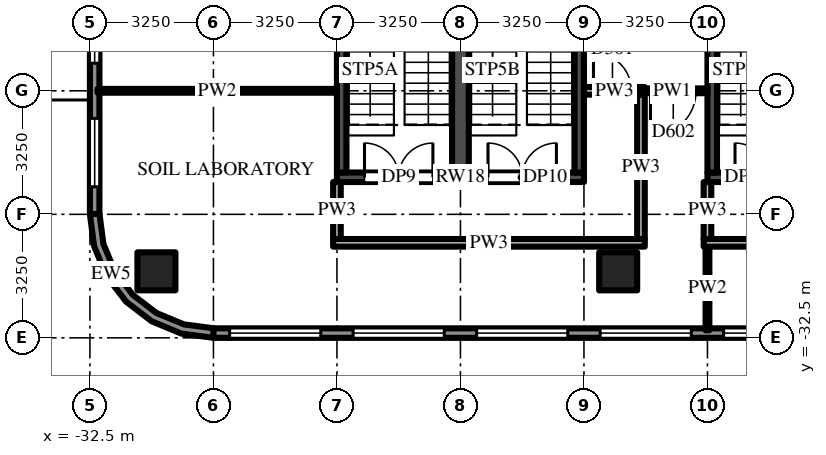
"""IFC4 building model, lengths in metres.
Left out: names, types, materials, properties, quantities, classifications, styles, units other than length and angle.
Written with IfcOpenShell. Run it as: python <this file> out.ifc"""

import sys

from ifc_helpers import new_model, si_unit, direction, frame, frame_2d, origin, origin_2d, place, context, subcontext, project, spatial, polyline, rectangle, outline, extrude, source, transform, mapped, element, fill, save


model = new_model("IFC4")
c1 = context("Model", 3, precision=1e-05, world=origin(), true_north=direction((0.0, 1.0)))
c2 = subcontext(c1, "Body", "Model", "MODEL_VIEW")
j1 = project(units=[si_unit("LENGTHUNIT", "METRE"), si_unit("PLANEANGLEUNIT", "RADIAN")], contexts=[c1])
p1 = place(None, origin())
s1 = spatial("IfcSite", under=j1, at=p1, CompositionType="ELEMENT")
p2 = place(p1, origin())
s2 = spatial("IfcBuilding", under=s1, at=p2, CompositionType="ELEMENT")
p3 = place(p2, frame((0.0, 0.0, 24.0)))
s3 = spatial("IfcBuildingStorey", under=s2, at=p3, CompositionType="ELEMENT", Elevation=24.0)
m1 = source(origin(), c2, "Body", "SweptSolid", [
    extrude(rectangle(XDim=1.0, YDim=1.0, at=origin_2d()), origin(), (0.0, 0.0, 1.0), 5.0),
])
for number, where, z_axis, x_axis in (
    (1, (-18.6, -30.75, 0.0), (0.0, 0.0, 1.0), (1.0, 0.0, 0.0)),
    (2, (-30.75, -30.75, 0.0), (0.0, 0.0, 1.0), (1.0, 0.0, 0.0)),
):
    element("IfcColumn", number, at=place(p3, frame(where, z_axis=z_axis, x_axis=x_axis)), inside=s3, PredefinedType="COLUMN", context=c2, shape_type="MappedRepresentation", body=[
        mapped(m1, transform((0.0, 0.0, 0.0))),
    ])
m2 = source(origin(), c2, "Body", "SweptSolid", [
    extrude(rectangle(XDim=6.5, YDim=0.25, at=frame_2d((3.25, 0.0))), origin(), (0.0, 0.0, 1.0), 4.7),
])
p4 = place(p3, frame((-26.0, -28.275, 0.0), z_axis=(0.0, 0.0, 1.0), x_axis=(1.0, 0.0, 0.0)))
e3 = element("IfcWall", 3, at=p4, inside=s3, PredefinedType="SHEAR", context=c2, shape_type="MappedRepresentation", body=[
    mapped(m2, transform((0.0, 0.0, 0.0))),
])
m3 = source(origin(), c2, "Body", "SweptSolid", [
    extrude(rectangle(XDim=1.8, YDim=2.1, at=frame_2d((0.9, 1.05))), frame((0.0, 0.135, 0.0), z_axis=(0.0, -1.0, 0.0), x_axis=(1.0, 0.0, 0.0)), (0.0, 0.0, 1.0), 0.27),
])
p5 = place(p4, frame((0.725, 0.0, 0.0)))
e4 = element("IfcOpeningElement", 4, at=p5, cuts=e3, PredefinedType="OPENING", context=c2, shape_type="MappedRepresentation", body=[
    mapped(m3, transform((0.0, 0.0, 0.0))),
])
p6 = place(p4, frame((3.975, 0.0, 0.0)))
e5 = element("IfcOpeningElement", 5, at=p6, cuts=e3, PredefinedType="OPENING", context=c2, shape_type="MappedRepresentation", body=[
    mapped(m3, transform((0.0, 0.0, 0.0))),
])
m4 = source(origin(), c2, "Body", "SweptSolid", [
    extrude(rectangle(XDim=8.3, YDim=0.25, at=frame_2d((4.15, 0.0))), origin(), (0.0, 0.0, 1.0), 4.7),
])
for number, where, z_axis, x_axis in (
    (6, (-25.875, -28.15, 0.0), (0.0, 0.0, 1.0), (0.0, 1.0, 0.0)),
    (7, (-19.625, -28.15, 0.0), (0.0, 0.0, 1.0), (0.0, 1.0, 0.0)),
):
    element("IfcWall", number, at=place(p3, frame(where, z_axis=z_axis, x_axis=x_axis)), inside=s3, PredefinedType="SHEAR", context=c2, shape_type="MappedRepresentation", body=[
        mapped(m4, transform((0.0, 0.0, 0.0))),
    ])
m5 = source(origin(), c2, "Body", "SweptSolid", [
    extrude(rectangle(XDim=8.3, YDim=0.44, at=frame_2d((4.15, 0.0))), origin(), (0.0, 0.0, 1.0), 4.7),
])
p7 = place(p3, frame((-22.75, -28.15, 0.0), z_axis=(0.0, 0.0, 1.0), x_axis=(0.0, 1.0, 0.0)))
e8 = element("IfcWall", 8, at=p7, inside=s3, PredefinedType="SHEAR", context=c2, shape_type="MappedRepresentation", body=[
    mapped(m5, transform((0.0, 0.0, 0.0))),
])
p8 = place(p3, frame((-16.25, -28.275, 0.0), z_axis=(0.0, 0.0, 1.0), x_axis=(1.0, 0.0, 0.0)))
e9 = element("IfcWall", 9, at=p8, inside=s3, PredefinedType="SHEAR", context=c2, shape_type="MappedRepresentation", body=[
    mapped(m2, transform((0.0, 0.0, 0.0))),
])
p9 = place(p8, frame((0.725, 0.0, 0.0)))
e10 = element("IfcOpeningElement", 10, at=p9, cuts=e9, PredefinedType="OPENING", context=c2, shape_type="MappedRepresentation", body=[
    mapped(m3, transform((0.0, 0.0, 0.0))),
])
p10 = place(p8, frame((3.975, 0.0, 0.0)))
e11 = element("IfcOpeningElement", 11, at=p10, cuts=e9, PredefinedType="OPENING", context=c2, shape_type="MappedRepresentation", body=[
    mapped(m3, transform((0.0, 0.0, 0.0))),
])
p11 = place(p3, frame((-16.125, -28.15, 0.0), z_axis=(0.0, 0.0, 1.0), x_axis=(0.0, 1.0, 0.0)))
e12 = element("IfcWall", 12, at=p11, inside=s3, PredefinedType="SHEAR", context=c2, shape_type="MappedRepresentation", body=[
    mapped(m4, transform((0.0, 0.0, 0.0))),
])
m6 = source(origin(), c2, "Body", "SweptSolid", [
    extrude(rectangle(XDim=58.5, YDim=0.25, at=frame_2d((29.25, 0.0))), origin(), (0.0, 0.0, 1.0), 4.7),
])
p12 = place(p3, frame((-32.375, 29.25, 0.0), z_axis=(0.0, 0.0, 1.0), x_axis=(0.0, -1.0, 0.0)))
e13 = element("IfcWall", 13, at=p12, inside=s3, PredefinedType="SOLIDWALL", context=c2, shape_type="MappedRepresentation", body=[
    mapped(m6, transform((0.0, 0.0, 0.0))),
])
m7 = source(origin(), c2, "Body", "SweptSolid", [
    extrude(rectangle(XDim=1.8, YDim=3.3, at=frame_2d((0.9, 1.65))), frame((0.0, 0.135, 0.0), z_axis=(0.0, -1.0, 0.0), x_axis=(1.0, 0.0, 0.0)), (0.0, 0.0, 1.0), 0.27),
])
p13 = place(p12, frame((0.725, 0.0, 0.6)))
e14 = element("IfcOpeningElement", 14, at=p13, cuts=e13, PredefinedType="OPENING", context=c2, shape_type="MappedRepresentation", body=[
    mapped(m7, transform((0.0, 0.0, 0.0))),
])
p14 = place(p12, frame((3.975, 0.0, 0.6)))
e15 = element("IfcOpeningElement", 15, at=p14, cuts=e13, PredefinedType="OPENING", context=c2, shape_type="MappedRepresentation", body=[
    mapped(m7, transform((0.0, 0.0, 0.0))),
])
p15 = place(p12, frame((7.225, 0.0, 0.6)))
e16 = element("IfcOpeningElement", 16, at=p15, cuts=e13, PredefinedType="OPENING", context=c2, shape_type="MappedRepresentation", body=[
    mapped(m7, transform((0.0, 0.0, 0.0))),
])
p16 = place(p12, frame((10.475, 0.0, 0.6)))
e17 = element("IfcOpeningElement", 17, at=p16, cuts=e13, PredefinedType="OPENING", context=c2, shape_type="MappedRepresentation", body=[
    mapped(m7, transform((0.0, 0.0, 0.0))),
])
p17 = place(p12, frame((13.725, 0.0, 0.6)))
e18 = element("IfcOpeningElement", 18, at=p17, cuts=e13, PredefinedType="OPENING", context=c2, shape_type="MappedRepresentation", body=[
    mapped(m7, transform((0.0, 0.0, 0.0))),
])
p18 = place(p12, frame((16.975, 0.0, 0.6)))
e19 = element("IfcOpeningElement", 19, at=p18, cuts=e13, PredefinedType="OPENING", context=c2, shape_type="MappedRepresentation", body=[
    mapped(m7, transform((0.0, 0.0, 0.0))),
])
p19 = place(p12, frame((20.225, 0.0, 0.6)))
e20 = element("IfcOpeningElement", 20, at=p19, cuts=e13, PredefinedType="OPENING", context=c2, shape_type="MappedRepresentation", body=[
    mapped(m7, transform((0.0, 0.0, 0.0))),
])
p20 = place(p12, frame((23.475, 0.0, 0.6)))
e21 = element("IfcOpeningElement", 21, at=p20, cuts=e13, PredefinedType="OPENING", context=c2, shape_type="MappedRepresentation", body=[
    mapped(m7, transform((0.0, 0.0, 0.0))),
])
p21 = place(p12, frame((26.725, 0.0, 0.6)))
e22 = element("IfcOpeningElement", 22, at=p21, cuts=e13, PredefinedType="OPENING", context=c2, shape_type="MappedRepresentation", body=[
    mapped(m7, transform((0.0, 0.0, 0.0))),
])
m8 = source(origin(), c2, "Body", "SweptSolid", [
    extrude(rectangle(XDim=1.8, YDim=2.4, at=frame_2d((0.9, 1.2))), frame((0.0, 0.135, 0.0), z_axis=(0.0, -1.0, 0.0), x_axis=(1.0, 0.0, 0.0)), (0.0, 0.0, 1.0), 0.27),
])
p22 = place(p12, frame((29.975, 0.0, 0.0)))
e23 = element("IfcOpeningElement", 23, at=p22, cuts=e13, PredefinedType="OPENING", context=c2, shape_type="MappedRepresentation", body=[
    mapped(m8, transform((0.0, 0.0, 0.0))),
])
p23 = place(p12, frame((33.225, 0.0, 0.6)))
e24 = element("IfcOpeningElement", 24, at=p23, cuts=e13, PredefinedType="OPENING", context=c2, shape_type="MappedRepresentation", body=[
    mapped(m7, transform((0.0, 0.0, 0.0))),
])
p24 = place(p12, frame((36.475, 0.0, 0.6)))
e25 = element("IfcOpeningElement", 25, at=p24, cuts=e13, PredefinedType="OPENING", context=c2, shape_type="MappedRepresentation", body=[
    mapped(m7, transform((0.0, 0.0, 0.0))),
])
p25 = place(p12, frame((39.725, 0.0, 0.6)))
e26 = element("IfcOpeningElement", 26, at=p25, cuts=e13, PredefinedType="OPENING", context=c2, shape_type="MappedRepresentation", body=[
    mapped(m7, transform((0.0, 0.0, 0.0))),
])
p26 = place(p12, frame((42.975, 0.0, 0.6)))
e27 = element("IfcOpeningElement", 27, at=p26, cuts=e13, PredefinedType="OPENING", context=c2, shape_type="MappedRepresentation", body=[
    mapped(m7, transform((0.0, 0.0, 0.0))),
])
p27 = place(p12, frame((46.225, 0.0, 0.6)))
e28 = element("IfcOpeningElement", 28, at=p27, cuts=e13, PredefinedType="OPENING", context=c2, shape_type="MappedRepresentation", body=[
    mapped(m7, transform((0.0, 0.0, 0.0))),
])
p28 = place(p12, frame((49.475, 0.0, 0.6)))
e29 = element("IfcOpeningElement", 29, at=p28, cuts=e13, PredefinedType="OPENING", context=c2, shape_type="MappedRepresentation", body=[
    mapped(m7, transform((0.0, 0.0, 0.0))),
])
p29 = place(p12, frame((52.725, 0.0, 0.6)))
e30 = element("IfcOpeningElement", 30, at=p29, cuts=e13, PredefinedType="OPENING", context=c2, shape_type="MappedRepresentation", body=[
    mapped(m7, transform((0.0, 0.0, 0.0))),
])
p30 = place(p12, frame((55.975, 0.0, 0.6)))
e31 = element("IfcOpeningElement", 31, at=p30, cuts=e13, PredefinedType="OPENING", context=c2, shape_type="MappedRepresentation", body=[
    mapped(m7, transform((0.0, 0.0, 0.0))),
])
p31 = place(p3, origin())
e32 = element("IfcWall", 32, at=p31, inside=s3, PredefinedType="SOLIDWALL", context=c2, shape_type="SweptSolid", body=[
    extrude(outline(polyline([(-32.5, -29.25), (-32.389, -30.091), (-32.065, -30.875), (-31.548, -31.548), (-30.875, -32.065), (-30.091, -32.389), (-29.25, -32.5), (-29.234, -32.25), (-30.026, -32.146), (-30.749, -31.846), (-31.37, -31.37), (-31.846, -30.749), (-32.146, -30.026), (-32.25, -29.234), (-32.5, -29.25)])), origin(), (0.0, 0.0, 1.0), 4.7),
])
p32 = place(p3, frame((-29.25, -32.375, 0.0), z_axis=(0.0, 0.0, 1.0), x_axis=(1.0, 0.0, 0.0)))
e33 = element("IfcWall", 33, at=p32, inside=s3, PredefinedType="SOLIDWALL", context=c2, shape_type="MappedRepresentation", body=[
    mapped(m6, transform((0.0, 0.0, 0.0))),
])
m9 = source(origin(), c2, "Body", "SweptSolid", [
    extrude(rectangle(XDim=2.4, YDim=3.3, at=frame_2d((1.2, 1.65))), frame((0.0, 0.135, 0.0), z_axis=(0.0, -1.0, 0.0), x_axis=(1.0, 0.0, 0.0)), (0.0, 0.0, 1.0), 0.27),
])
p33 = place(p32, frame((0.425, 0.0, 0.6)))
e34 = element("IfcOpeningElement", 34, at=p33, cuts=e33, PredefinedType="OPENING", context=c2, shape_type="MappedRepresentation", body=[
    mapped(m9, transform((0.0, 0.0, 0.0))),
])
p34 = place(p32, frame((3.675, 0.0, 0.6)))
e35 = element("IfcOpeningElement", 35, at=p34, cuts=e33, PredefinedType="OPENING", context=c2, shape_type="MappedRepresentation", body=[
    mapped(m9, transform((0.0, 0.0, 0.0))),
])
p35 = place(p32, frame((6.925, 0.0, 0.6)))
e36 = element("IfcOpeningElement", 36, at=p35, cuts=e33, PredefinedType="OPENING", context=c2, shape_type="MappedRepresentation", body=[
    mapped(m9, transform((0.0, 0.0, 0.0))),
])
p36 = place(p32, frame((10.175, 0.0, 0.6)))
e37 = element("IfcOpeningElement", 37, at=p36, cuts=e33, PredefinedType="OPENING", context=c2, shape_type="MappedRepresentation", body=[
    mapped(m9, transform((0.0, 0.0, 0.0))),
])
p37 = place(p32, frame((13.425, 0.0, 0.6)))
e38 = element("IfcOpeningElement", 38, at=p37, cuts=e33, PredefinedType="OPENING", context=c2, shape_type="MappedRepresentation", body=[
    mapped(m9, transform((0.0, 0.0, 0.0))),
])
p38 = place(p32, frame((16.675, 0.0, 0.6)))
e39 = element("IfcOpeningElement", 39, at=p38, cuts=e33, PredefinedType="OPENING", context=c2, shape_type="MappedRepresentation", body=[
    mapped(m9, transform((0.0, 0.0, 0.0))),
])
p39 = place(p32, frame((19.925, 0.0, 0.6)))
e40 = element("IfcOpeningElement", 40, at=p39, cuts=e33, PredefinedType="OPENING", context=c2, shape_type="MappedRepresentation", body=[
    mapped(m9, transform((0.0, 0.0, 0.0))),
])
p40 = place(p32, frame((23.175, 0.0, 0.6)))
e41 = element("IfcOpeningElement", 41, at=p40, cuts=e33, PredefinedType="OPENING", context=c2, shape_type="MappedRepresentation", body=[
    mapped(m9, transform((0.0, 0.0, 0.0))),
])
p41 = place(p32, frame((26.425, 0.0, 0.6)))
e42 = element("IfcOpeningElement", 42, at=p41, cuts=e33, PredefinedType="OPENING", context=c2, shape_type="MappedRepresentation", body=[
    mapped(m9, transform((0.0, 0.0, 0.0))),
])
p42 = place(p32, frame((29.675, 0.0, 0.6)))
e43 = element("IfcOpeningElement", 43, at=p42, cuts=e33, PredefinedType="OPENING", context=c2, shape_type="MappedRepresentation", body=[
    mapped(m9, transform((0.0, 0.0, 0.0))),
])
p43 = place(p32, frame((32.925, 0.0, 0.6)))
e44 = element("IfcOpeningElement", 44, at=p43, cuts=e33, PredefinedType="OPENING", context=c2, shape_type="MappedRepresentation", body=[
    mapped(m9, transform((0.0, 0.0, 0.0))),
])
p44 = place(p32, frame((36.175, 0.0, 0.6)))
e45 = element("IfcOpeningElement", 45, at=p44, cuts=e33, PredefinedType="OPENING", context=c2, shape_type="MappedRepresentation", body=[
    mapped(m9, transform((0.0, 0.0, 0.0))),
])
p45 = place(p32, frame((39.425, 0.0, 0.6)))
e46 = element("IfcOpeningElement", 46, at=p45, cuts=e33, PredefinedType="OPENING", context=c2, shape_type="MappedRepresentation", body=[
    mapped(m9, transform((0.0, 0.0, 0.0))),
])
p46 = place(p32, frame((42.675, 0.0, 0.6)))
e47 = element("IfcOpeningElement", 47, at=p46, cuts=e33, PredefinedType="OPENING", context=c2, shape_type="MappedRepresentation", body=[
    mapped(m9, transform((0.0, 0.0, 0.0))),
])
p47 = place(p32, frame((45.925, 0.0, 0.6)))
e48 = element("IfcOpeningElement", 48, at=p47, cuts=e33, PredefinedType="OPENING", context=c2, shape_type="MappedRepresentation", body=[
    mapped(m9, transform((0.0, 0.0, 0.0))),
])
p48 = place(p32, frame((49.175, 0.0, 0.6)))
e49 = element("IfcOpeningElement", 49, at=p48, cuts=e33, PredefinedType="OPENING", context=c2, shape_type="MappedRepresentation", body=[
    mapped(m9, transform((0.0, 0.0, 0.0))),
])
p49 = place(p32, frame((52.425, 0.0, 0.6)))
e50 = element("IfcOpeningElement", 50, at=p49, cuts=e33, PredefinedType="OPENING", context=c2, shape_type="MappedRepresentation", body=[
    mapped(m9, transform((0.0, 0.0, 0.0))),
])
p50 = place(p32, frame((55.675, 0.0, 0.6)))
e51 = element("IfcOpeningElement", 51, at=p50, cuts=e33, PredefinedType="OPENING", context=c2, shape_type="MappedRepresentation", body=[
    mapped(m9, transform((0.0, 0.0, 0.0))),
])
m10 = source(origin(), c2, "Body", "SweptSolid", [
    extrude(rectangle(XDim=1.5, YDim=0.2, at=frame_2d((0.75, 0.0))), origin(), (0.0, 0.0, 1.0), 4.7),
])
p51 = place(p3, frame((-26.0, -29.9, 0.0), z_axis=(0.0, 0.0, 1.0), x_axis=(0.0, 1.0, 0.0)))
e52 = element("IfcWall", 52, at=p51, inside=s3, PredefinedType="PARTITIONING", context=c2, shape_type="MappedRepresentation", body=[
    mapped(m10, transform((0.0, 0.0, 0.0))),
])
m11 = source(origin(), c2, "Body", "SweptSolid", [
    extrude(rectangle(XDim=3.8, YDim=0.2, at=frame_2d((1.9, 0.0))), origin(), (0.0, 0.0, 1.0), 4.274),
])
p52 = place(p3, frame((-18.0, -29.9, 0.0), z_axis=(0.0, 0.0, 1.0), x_axis=(0.0, 1.0, 0.0)))
e53 = element("IfcWall", 53, at=p52, inside=s3, PredefinedType="PARTITIONING", context=c2, shape_type="MappedRepresentation", body=[
    mapped(m11, transform((0.0, 0.0, 0.0))),
])
p53 = place(p3, frame((-16.25, -29.9, 0.0), z_axis=(0.0, 0.0, 1.0), x_axis=(0.0, 1.0, 0.0)))
e54 = element("IfcWall", 54, at=p53, inside=s3, PredefinedType="PARTITIONING", context=c2, shape_type="MappedRepresentation", body=[
    mapped(m10, transform((0.0, 0.0, 0.0))),
])
m12 = source(origin(), c2, "Body", "SweptSolid", [
    extrude(rectangle(XDim=2.2, YDim=0.1, at=frame_2d((1.1, 0.0))), origin(), (0.0, 0.0, 1.0), 3.762),
])
p54 = place(p3, frame((-16.25, -32.3, 0.0), z_axis=(0.0, 0.0, 1.0), x_axis=(0.0, 1.0, 0.0)))
e55 = element("IfcWall", 55, at=p54, inside=s3, PredefinedType="PARTITIONING", context=c2, shape_type="MappedRepresentation", body=[
    mapped(m12, transform((0.0, 0.0, 0.0))),
])
m13 = source(origin(), c2, "Body", "SweptSolid", [
    extrude(rectangle(XDim=8.2, YDim=0.2, at=frame_2d((4.1, 0.0))), origin(), (0.0, 0.0, 1.0), 3.762),
])
p55 = place(p3, frame((-26.1, -30.0, 0.0), z_axis=(0.0, 0.0, 1.0), x_axis=(1.0, 0.0, 0.0)))
e56 = element("IfcWall", 56, at=p55, inside=s3, PredefinedType="PARTITIONING", context=c2, shape_type="MappedRepresentation", body=[
    mapped(m13, transform((0.0, 0.0, 0.0))),
])
m14 = source(origin(), c2, "Body", "SweptSolid", [
    extrude(rectangle(XDim=8.2, YDim=0.2, at=frame_2d((4.1, 0.0))), origin(), (0.0, 0.0, 1.0), 4.7),
])
p56 = place(p3, frame((-16.35, -30.0, 0.0), z_axis=(0.0, 0.0, 1.0), x_axis=(1.0, 0.0, 0.0)))
e57 = element("IfcWall", 57, at=p56, inside=s3, PredefinedType="PARTITIONING", context=c2, shape_type="MappedRepresentation", body=[
    mapped(m14, transform((0.0, 0.0, 0.0))),
])
m15 = source(origin(), c2, "Body", "SweptSolid", [
    extrude(rectangle(XDim=1.6, YDim=0.2, at=frame_2d((0.8, 0.0))), origin(), (0.0, 0.0, 1.0), 3.762),
])
p57 = place(p3, frame((-19.5, -26.0, 0.0), z_axis=(0.0, 0.0, 1.0), x_axis=(1.0, 0.0, 0.0)))
e58 = element("IfcWall", 58, at=p57, inside=s3, PredefinedType="PARTITIONING", context=c2, shape_type="MappedRepresentation", body=[
    mapped(m15, transform((0.0, 0.0, 0.0))),
])
m16 = source(origin(), c2, "Body", "SweptSolid", [
    extrude(rectangle(XDim=1.0, YDim=2.1, at=frame_2d((0.5, 1.05))), frame((0.0, 0.11, 0.0), z_axis=(0.0, -1.0, 0.0), x_axis=(1.0, 0.0, 0.0)), (0.0, 0.0, 1.0), 0.22),
])
p58 = place(p57, frame((0.25, 0.0, 0.0)))
e59 = element("IfcOpeningElement", 59, at=p58, cuts=e58, PredefinedType="OPENING", context=c2, shape_type="MappedRepresentation", body=[
    mapped(m16, transform((0.0, 0.0, 0.0))),
])
m17 = source(origin(), c2, "Body", "SweptSolid", [
    extrude(rectangle(XDim=6.3, YDim=0.1, at=frame_2d((3.15, 0.0))), origin(), (0.0, 0.0, 1.0), 3.762),
])
p59 = place(p3, frame((-32.3, -26.0, 0.0), z_axis=(0.0, 0.0, 1.0), x_axis=(1.0, 0.0, 0.0)))
e60 = element("IfcWall", 60, at=p59, inside=s3, PredefinedType="PARTITIONING", context=c2, shape_type="MappedRepresentation", body=[
    mapped(m17, transform((0.0, 0.0, 0.0))),
])
m18 = source(origin(), c2, "Body", "SweptSolid", [
    extrude(rectangle(XDim=1.85, YDim=0.125, at=frame_2d((0.925, 0.0))), origin(), (0.0, 0.0, 1.0), 4.7),
])
p60 = place(p3, frame((-16.25, -26.0, 0.0), z_axis=(0.0, 0.0, 1.0), x_axis=(-1.0, 0.0, 0.0)))
e61 = element("IfcWall", 61, at=p60, inside=s3, PredefinedType="PARTITIONING", context=c2, shape_type="MappedRepresentation", body=[
    mapped(m18, transform((0.0, 0.0, 0.0))),
])
m19 = source(origin(), c2, "Body", "SweptSolid", [
    extrude(rectangle(XDim=1.2, YDim=2.1, at=frame_2d((0.6, 1.05))), frame((0.0, 0.073, 0.0), z_axis=(0.0, -1.0, 0.0), x_axis=(1.0, 0.0, 0.0)), (0.0, 0.0, 1.0), 0.145),
])
p61 = place(p60, frame((0.3, 0.0, 0.0)))
e62 = element("IfcOpeningElement", 62, at=p61, cuts=e61, PredefinedType="OPENING", context=c2, shape_type="MappedRepresentation", body=[
    mapped(m19, transform((0.0, 0.0, 0.0))),
])
m20 = source(origin(), c2, "Body", "SweptSolid", [
    extrude(rectangle(XDim=1.8, YDim=2.1, at=frame_2d((0.9, 1.05))), frame((0.0, 0.025, 0.0), z_axis=(0.0, -1.0, 0.0), x_axis=(1.0, 0.0, 0.0)), (0.0, 0.0, 1.0), 0.05),
])
p62 = place(p5, origin())
e63 = element("IfcDoor", 63, at=p62, inside=s3, OperationType="DOUBLE_DOOR_SINGLE_SWING", PredefinedType="DOOR", context=c2, shape_type="MappedRepresentation", body=[
    mapped(m20, transform((0.0, 0.0, 0.0))),
])
fill(e4, e63)
p63 = place(p6, origin())
e64 = element("IfcDoor", 64, at=p63, inside=s3, OperationType="DOUBLE_DOOR_SINGLE_SWING", PredefinedType="DOOR", context=c2, shape_type="MappedRepresentation", body=[
    mapped(m20, transform((0.0, 0.0, 0.0))),
])
fill(e5, e64)
p64 = place(p9, origin())
e65 = element("IfcDoor", 65, at=p64, inside=s3, OperationType="DOUBLE_DOOR_SINGLE_SWING", PredefinedType="DOOR", context=c2, shape_type="MappedRepresentation", body=[
    mapped(m20, transform((0.0, 0.0, 0.0))),
])
fill(e10, e65)
m21 = source(origin(), c2, "Body", "SweptSolid", [
    extrude(rectangle(XDim=1.8, YDim=3.3, at=frame_2d((0.9, 1.65))), frame((0.0, 0.03, 0.0), z_axis=(0.0, -1.0, 0.0), x_axis=(1.0, 0.0, 0.0)), (0.0, 0.0, 1.0), 0.06),
])
p65 = place(p29, origin())
e66 = element("IfcWindow", 66, at=p65, inside=s3, PartitioningType="SINGLE_PANEL", PredefinedType="WINDOW", context=c2, shape_type="MappedRepresentation", body=[
    mapped(m21, transform((0.0, 0.0, 0.0))),
])
fill(e30, e66)
p66 = place(p30, origin())
e67 = element("IfcWindow", 67, at=p66, inside=s3, PartitioningType="SINGLE_PANEL", PredefinedType="WINDOW", context=c2, shape_type="MappedRepresentation", body=[
    mapped(m21, transform((0.0, 0.0, 0.0))),
])
fill(e31, e67)
m22 = source(origin(), c2, "Body", "SweptSolid", [
    extrude(rectangle(XDim=2.4, YDim=3.3, at=frame_2d((1.2, 1.65))), frame((0.0, 0.03, 0.0), z_axis=(0.0, -1.0, 0.0), x_axis=(1.0, 0.0, 0.0)), (0.0, 0.0, 1.0), 0.06),
])
p67 = place(p33, origin())
e68 = element("IfcWindow", 68, at=p67, inside=s3, PartitioningType="SINGLE_PANEL", PredefinedType="WINDOW", context=c2, shape_type="MappedRepresentation", body=[
    mapped(m22, transform((0.0, 0.0, 0.0))),
])
fill(e34, e68)
p68 = place(p34, origin())
e69 = element("IfcWindow", 69, at=p68, inside=s3, PartitioningType="SINGLE_PANEL", PredefinedType="WINDOW", context=c2, shape_type="MappedRepresentation", body=[
    mapped(m22, transform((0.0, 0.0, 0.0))),
])
fill(e35, e69)
p69 = place(p35, origin())
e70 = element("IfcWindow", 70, at=p69, inside=s3, PartitioningType="SINGLE_PANEL", PredefinedType="WINDOW", context=c2, shape_type="MappedRepresentation", body=[
    mapped(m22, transform((0.0, 0.0, 0.0))),
])
fill(e36, e70)
p70 = place(p36, origin())
e71 = element("IfcWindow", 71, at=p70, inside=s3, PartitioningType="SINGLE_PANEL", PredefinedType="WINDOW", context=c2, shape_type="MappedRepresentation", body=[
    mapped(m22, transform((0.0, 0.0, 0.0))),
])
fill(e37, e71)
p71 = place(p37, origin())
e72 = element("IfcWindow", 72, at=p71, inside=s3, PartitioningType="SINGLE_PANEL", PredefinedType="WINDOW", context=c2, shape_type="MappedRepresentation", body=[
    mapped(m22, transform((0.0, 0.0, 0.0))),
])
fill(e38, e72)
m23 = source(origin(), c2, "Body", "SweptSolid", [
    extrude(rectangle(XDim=1.0, YDim=2.1, at=frame_2d((0.5, 1.05))), frame((0.0, 0.025, 0.0), z_axis=(0.0, -1.0, 0.0), x_axis=(1.0, 0.0, 0.0)), (0.0, 0.0, 1.0), 0.05),
])
p72 = place(p58, origin())
e73 = element("IfcDoor", 73, at=p72, inside=s3, OperationType="SINGLE_SWING_LEFT", PredefinedType="DOOR", context=c2, shape_type="MappedRepresentation", body=[
    mapped(m23, transform((0.0, 0.0, 0.0))),
])
fill(e59, e73)
m24 = source(origin(), c2, "Body", "SweptSolid", [
    extrude(rectangle(XDim=1.2, YDim=2.1, at=frame_2d((0.6, 1.05))), frame((0.0, 0.025, 0.0), z_axis=(0.0, -1.0, 0.0), x_axis=(1.0, 0.0, 0.0)), (0.0, 0.0, 1.0), 0.05),
])
p73 = place(p61, origin())
e74 = element("IfcDoor", 74, at=p73, inside=s3, OperationType="SINGLE_SWING_RIGHT", PredefinedType="DOOR", context=c2, shape_type="MappedRepresentation", body=[
    mapped(m24, transform((0.0, 0.0, 0.0))),
])
fill(e62, e74)
save(model, sys.argv[1])
